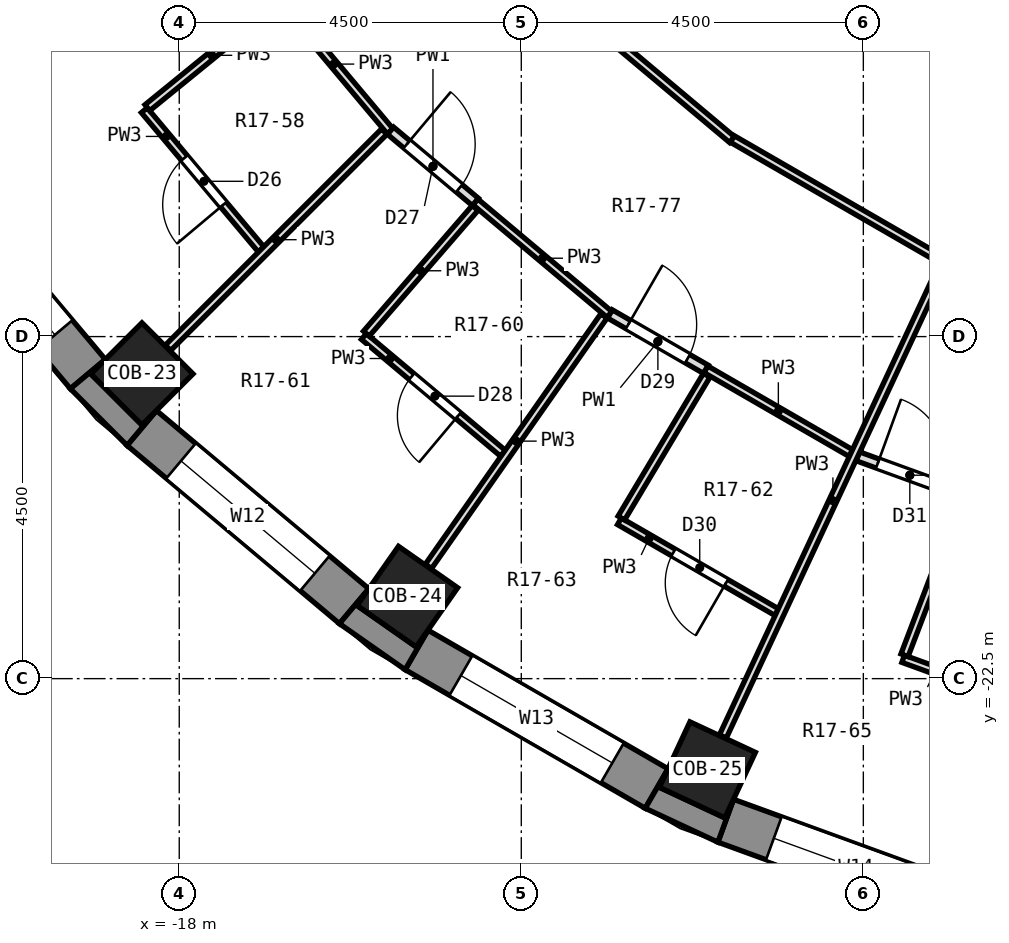
"""IFC4 building model, lengths in metres.
Left out: names, types, materials, properties, quantities, classifications, styles, units other than length and angle.
Written with IfcOpenShell. Run it as: python <this file> out.ifc"""

import sys

from ifc_helpers import new_model, si_unit, direction, frame, frame_2d, origin, origin_2d, place, context, subcontext, project, spatial, polyline, rectangle, outline, extrude, element, fill, save


model = new_model("IFC4")
c1 = context("Model", 3, precision=1e-05, world=origin(), true_north=direction((0.0, 1.0)))
c2 = subcontext(c1, "Body", "Model", "MODEL_VIEW")
j1 = project(units=[si_unit("LENGTHUNIT", "METRE"), si_unit("PLANEANGLEUNIT", "RADIAN")], contexts=[c1])
p1 = place(None, origin())
s1 = spatial("IfcSite", under=j1, at=p1, CompositionType="ELEMENT")
p2 = place(p1, origin())
s2 = spatial("IfcBuilding", under=s1, at=p2, CompositionType="ELEMENT")
p3 = place(p2, frame((0.0, 0.0, 91.9)))
s3 = spatial("IfcBuildingStorey", under=s2, at=p3, CompositionType="ELEMENT", Elevation=91.9)
for number, where, z_axis, x_axis in (
    (1, (-18.491, -18.491, 0.0), (0.0, 0.0, 1.0), (-0.707, -0.707, 0.0)),
    (2, (-14.999, -21.421, 0.0), (0.0, 0.0, 1.0), (-0.574, -0.819, 0.0)),
    (3, (-11.052, -23.7, 0.0), (0.0, 0.0, 1.0), (-0.423, -0.906, 0.0)),
):
    element("IfcColumn", number, at=place(p3, frame(where, z_axis=z_axis, x_axis=x_axis)), inside=s3, PredefinedType="COLUMN", context=c2, shape_type="SweptSolid", body=[
        extrude(rectangle(XDim=0.95, YDim=0.95, at=origin_2d()), origin(), (0.0, 0.0, 1.0), 3.3),
    ])
p4 = place(p3, frame((-21.547, -15.699, 0.0), z_axis=(0.0, 0.0, 1.0), x_axis=(0.642774476932, -0.766055462616, 0.0)))
e4 = element("IfcWall", 4, at=p4, inside=s3, PredefinedType="SOLIDWALL", context=c2, shape_type="SweptSolid", body=[
    extrude(rectangle(XDim=3.648, YDim=0.6, at=frame_2d((1.824, 0.0))), origin(), (0.0, 0.0, 1.0), 2.8),
])
p5 = place(p4, frame((0.674, 0.0, 0.9)))
e5 = element("IfcOpeningElement", 5, at=p5, cuts=e4, PredefinedType="OPENING", context=c2, shape_type="SweptSolid", body=[
    extrude(rectangle(XDim=2.3, YDim=1.8, at=frame_2d((1.15, 0.9))), frame((0.0, 0.312, 0.0), z_axis=(0.0, -1.0, 0.0), x_axis=(1.0, 0.0, 0.0)), (0.0, 0.0, 1.0), 0.624),
])
p6 = place(p3, frame((-18.494, -19.202, 0.0), z_axis=(0.0, 0.0, 1.0), x_axis=(0.766055462616, -0.642774476932, 0.0)))
e6 = element("IfcWall", 6, at=p6, inside=s3, PredefinedType="SOLIDWALL", context=c2, shape_type="SweptSolid", body=[
    extrude(rectangle(XDim=3.648, YDim=0.6, at=frame_2d((1.824, 0.0))), origin(), (0.0, 0.0, 1.0), 2.8),
])
p7 = place(p6, frame((0.674, 0.0, 0.9)))
e7 = element("IfcOpeningElement", 7, at=p7, cuts=e6, PredefinedType="OPENING", context=c2, shape_type="SweptSolid", body=[
    extrude(rectangle(XDim=2.3, YDim=1.8, at=frame_2d((1.15, 0.9))), frame((0.0, 0.312, 0.0), z_axis=(0.0, -1.0, 0.0), x_axis=(1.0, 0.0, 0.0)), (0.0, 0.0, 1.0), 0.624),
])
p8 = place(p3, frame((-14.878, -22.122, 0.0), z_axis=(0.0, 0.0, 1.0), x_axis=(0.866051847062, -0.499954196102, 0.0)))
e8 = element("IfcWall", 8, at=p8, inside=s3, PredefinedType="SOLIDWALL", context=c2, shape_type="SweptSolid", body=[
    extrude(rectangle(XDim=3.648, YDim=0.6, at=frame_2d((1.824, 0.0))), origin(), (0.0, 0.0, 1.0), 2.8),
])
p9 = place(p8, frame((0.674, 0.0, 0.9)))
e9 = element("IfcOpeningElement", 9, at=p9, cuts=e8, PredefinedType="OPENING", context=c2, shape_type="SweptSolid", body=[
    extrude(rectangle(XDim=2.3, YDim=1.8, at=frame_2d((1.15, 0.9))), frame((0.0, 0.312, 0.0), z_axis=(0.0, -1.0, 0.0), x_axis=(1.0, 0.0, 0.0)), (0.0, 0.0, 1.0), 0.624),
])
p10 = place(p3, frame((-10.811, -24.369, 0.0), z_axis=(0.0, 0.0, 1.0), x_axis=(0.939703505393, -0.341990236633, 0.0)))
e10 = element("IfcWall", 10, at=p10, inside=s3, PredefinedType="SOLIDWALL", context=c2, shape_type="SweptSolid", body=[
    extrude(rectangle(XDim=3.648, YDim=0.6, at=frame_2d((1.824, 0.0))), origin(), (0.0, 0.0, 1.0), 2.8),
])
p11 = place(p10, frame((0.674, 0.0, 0.9)))
e11 = element("IfcOpeningElement", 11, at=p11, cuts=e10, PredefinedType="OPENING", context=c2, shape_type="SweptSolid", body=[
    extrude(rectangle(XDim=2.3, YDim=1.8, at=frame_2d((1.15, 0.9))), frame((0.0, 0.312, 0.0), z_axis=(0.0, -1.0, 0.0), x_axis=(1.0, 0.0, 0.0)), (0.0, 0.0, 1.0), 0.624),
])
p12 = place(p3, origin())
e12 = element("IfcWall", 12, at=p12, inside=s3, PredefinedType="SOLIDWALL", context=c2, shape_type="SweptSolid", body=[
    extrude(outline(polyline([(-19.432, -18.686), (-18.686, -19.432), (-18.301, -18.972), (-18.491, -19.163), (-19.163, -18.491), (-18.972, -18.301), (-19.432, -18.686)])), origin(), (0.0, 0.0, 1.0), 2.8),
])
p13 = place(p3, origin())
e13 = element("IfcWall", 13, at=p13, inside=s3, PredefinedType="SOLIDWALL", context=c2, shape_type="SweptSolid", body=[
    extrude(outline(polyline([(-15.028, -22.382), (-14.728, -21.862), (-14.882, -22.083), (-15.661, -21.538), (-15.506, -21.317), (-15.892, -21.777), (-15.028, -22.382)])), origin(), (0.0, 0.0, 1.0), 2.8),
])
p14 = place(p3, origin())
e14 = element("IfcWall", 14, at=p14, inside=s3, PredefinedType="SOLIDWALL", context=c2, shape_type="SweptSolid", body=[
    extrude(outline(polyline([(-10.913, -24.651), (-10.708, -24.087), (-10.822, -24.331), (-11.683, -23.93), (-11.569, -23.686), (-11.869, -24.206), (-10.913, -24.651)])), origin(), (0.0, 0.0, 1.0), 2.8),
])
p15 = place(p3, frame((-18.46, -15.022, 0.0), z_axis=(0.0, 0.0, 1.0), x_axis=(0.642942941421, -0.765914077477, 0.0)))
e15 = element("IfcWall", 15, at=p15, inside=s3, PredefinedType="PARTITIONING", context=c2, shape_type="SweptSolid", body=[
    extrude(rectangle(XDim=2.39, YDim=0.1, at=frame_2d((1.195, 0.0))), origin(), (0.0, 0.0, 1.0), 2.8),
])
p16 = place(p15, frame((0.821, 0.0, 0.0)))
e16 = element("IfcOpeningElement", 16, at=p16, cuts=e15, PredefinedType="OPENING", context=c2, shape_type="SweptSolid", body=[
    extrude(rectangle(XDim=0.8, YDim=2.1, at=frame_2d((0.4, 1.05))), frame((0.0, 0.062, 0.0), z_axis=(0.0, -1.0, 0.0), x_axis=(1.0, 0.0, 0.0)), (0.0, 0.0, 1.0), 0.124),
])
p17 = place(p3, frame((-16.708, -13.532, 0.0), z_axis=(0.0, 0.0, 1.0), x_axis=(0.642762571273, -0.766065452145, 0.0)))
e17 = element("IfcWall", 17, at=p17, inside=s3, PredefinedType="PARTITIONING", context=c2, shape_type="SweptSolid", body=[
    extrude(rectangle(XDim=2.307, YDim=0.1, at=frame_2d((1.153, 0.0))), origin(), (0.0, 0.0, 1.0), 2.8),
])
p18 = place(p3, frame((-15.571, -17.999, 0.0), z_axis=(0.0, 0.0, 1.0), x_axis=(0.765914077477, -0.642942941421, 0.0)))
e18 = element("IfcWall", 18, at=p18, inside=s3, PredefinedType="PARTITIONING", context=c2, shape_type="SweptSolid", body=[
    extrude(rectangle(XDim=2.39, YDim=0.1, at=frame_2d((1.195, 0.0))), origin(), (0.0, 0.0, 1.0), 2.8),
])
p19 = place(p18, frame((0.82, 0.0, 0.0)))
e19 = element("IfcOpeningElement", 19, at=p19, cuts=e18, PredefinedType="OPENING", context=c2, shape_type="SweptSolid", body=[
    extrude(rectangle(XDim=0.8, YDim=2.1, at=frame_2d((0.4, 1.05))), frame((0.0, 0.062, 0.0), z_axis=(0.0, -1.0, 0.0), x_axis=(1.0, 0.0, 0.0)), (0.0, 0.0, 1.0), 0.124),
])
p20 = place(p3, frame((-14.104, -16.228, 0.0), z_axis=(0.0, 0.0, 1.0), x_axis=(0.76604687987, -0.642784705669, 0.0)))
e20 = element("IfcWall", 20, at=p20, inside=s3, PredefinedType="PARTITIONING", context=c2, shape_type="SweptSolid", body=[
    extrude(rectangle(XDim=2.305, YDim=0.1, at=frame_2d((1.153, 0.0))), origin(), (0.0, 0.0, 1.0), 2.8),
])
p21 = place(p3, frame((-15.22, -15.292, 0.0), z_axis=(0.0, 0.0, 1.0), x_axis=(0.766114305984, -0.642704341177, 0.0)))
e21 = element("IfcWall", 21, at=p21, inside=s3, PredefinedType="PARTITIONING", context=c2, shape_type="SweptSolid", body=[
    extrude(rectangle(XDim=1.456, YDim=0.125, at=frame_2d((0.728, 0.0))), origin(), (0.0, 0.0, 1.0), 2.8),
])
p22 = place(p21, frame((0.278, 0.0, 0.0)))
e22 = element("IfcOpeningElement", 22, at=p22, cuts=e21, PredefinedType="OPENING", context=c2, shape_type="SweptSolid", body=[
    extrude(rectangle(XDim=0.9, YDim=2.1, at=frame_2d((0.45, 1.05))), frame((0.0, 0.074, 0.0), z_axis=(0.0, -1.0, 0.0), x_axis=(1.0, 0.0, 0.0)), (0.0, 0.0, 1.0), 0.149),
])
p23 = place(p3, frame((-13.235, -13.305, 0.0), z_axis=(0.0, 0.0, 1.0), x_axis=(0.766132303871, -0.642682886784, 0.0)))
e23 = element("IfcWall", 23, at=p23, inside=s3, PredefinedType="PARTITIONING", context=c2, shape_type="SweptSolid", body=[
    extrude(rectangle(XDim=3.273, YDim=0.1, at=frame_2d((1.636, 0.0))), origin(), (0.0, 0.0, 1.0), 2.8),
])
p24 = place(p3, frame((-12.209, -20.43, 0.0), z_axis=(0.0, 0.0, 1.0), x_axis=(0.865989934965, -0.500061428766, 0.0)))
e24 = element("IfcWall", 24, at=p24, inside=s3, PredefinedType="PARTITIONING", context=c2, shape_type="SweptSolid", body=[
    extrude(rectangle(XDim=2.39, YDim=0.1, at=frame_2d((1.195, 0.0))), origin(), (0.0, 0.0, 1.0), 2.8),
])
p25 = place(p24, frame((0.82, 0.0, 0.0)))
e25 = element("IfcOpeningElement", 25, at=p25, cuts=e24, PredefinedType="OPENING", context=c2, shape_type="SweptSolid", body=[
    extrude(rectangle(XDim=0.8, YDim=2.1, at=frame_2d((0.4, 1.05))), frame((0.0, 0.062, 0.0), z_axis=(0.0, -1.0, 0.0), x_axis=(1.0, 0.0, 0.0)), (0.0, 0.0, 1.0), 0.124),
])
p26 = place(p3, frame((-11.072, -18.43, 0.0), z_axis=(0.0, 0.0, 1.0), x_axis=(0.865848017448, -0.500307116361, 0.0)))
e26 = element("IfcWall", 26, at=p26, inside=s3, PredefinedType="PARTITIONING", context=c2, shape_type="SweptSolid", body=[
    extrude(rectangle(XDim=2.205, YDim=0.1, at=frame_2d((1.102, 0.0))), origin(), (0.0, 0.0, 1.0), 2.8),
])
p27 = place(p3, frame((-12.334, -17.702, 0.0), z_axis=(0.0, 0.0, 1.0), x_axis=(0.866110229381, -0.499853048967, 0.0)))
e27 = element("IfcWall", 27, at=p27, inside=s3, PredefinedType="PARTITIONING", context=c2, shape_type="SweptSolid", body=[
    extrude(rectangle(XDim=1.457, YDim=0.125, at=frame_2d((0.728, 0.0))), origin(), (0.0, 0.0, 1.0), 2.8),
])
p28 = place(p27, frame((0.278, 0.0, 0.0)))
e28 = element("IfcOpeningElement", 28, at=p28, cuts=e27, PredefinedType="OPENING", context=c2, shape_type="SweptSolid", body=[
    extrude(rectangle(XDim=0.9, YDim=2.1, at=frame_2d((0.45, 1.05))), frame((0.0, 0.074, 0.0), z_axis=(0.0, -1.0, 0.0), x_axis=(1.0, 0.0, 0.0)), (0.0, 0.0, 1.0), 0.149),
])
p29 = place(p3, frame((-10.723, -15.401, 0.0), z_axis=(0.0, 0.0, 1.0), x_axis=(0.866002935623, -0.500038913978, 0.0)))
e29 = element("IfcWall", 29, at=p29, inside=s3, PredefinedType="PARTITIONING", context=c2, shape_type="SweptSolid", body=[
    extrude(rectangle(XDim=3.272, YDim=0.1, at=frame_2d((1.636, 0.0))), origin(), (0.0, 0.0, 1.0), 2.8),
])
p30 = place(p3, frame((-8.476, -22.239, 0.0), z_axis=(0.0, 0.0, 1.0), x_axis=(0.939644231496, -0.342153062556, 0.0)))
e30 = element("IfcWall", 30, at=p30, inside=s3, PredefinedType="PARTITIONING", context=c2, shape_type="SweptSolid", body=[
    extrude(rectangle(XDim=2.39, YDim=0.1, at=frame_2d((1.195, 0.0))), origin(), (0.0, 0.0, 1.0), 2.8),
])
p31 = place(p30, frame((0.82, 0.0, 0.0)))
e31 = element("IfcOpeningElement", 31, at=p31, cuts=e30, PredefinedType="OPENING", context=c2, shape_type="SweptSolid", body=[
    extrude(rectangle(XDim=0.8, YDim=2.1, at=frame_2d((0.4, 1.05))), frame((0.0, 0.062, 0.0), z_axis=(0.0, -1.0, 0.0), x_axis=(1.0, 0.0, 0.0)), (0.0, 0.0, 1.0), 0.124),
])
p32 = place(p3, frame((-9.073, -19.575, 0.0), z_axis=(0.0, 0.0, 1.0), x_axis=(0.939788529673, -0.341756520778, 0.0)))
e32 = element("IfcWall", 32, at=p32, inside=s3, PredefinedType="PARTITIONING", context=c2, shape_type="SweptSolid", body=[
    extrude(rectangle(XDim=1.457, YDim=0.125, at=frame_2d((0.728, 0.0))), origin(), (0.0, 0.0, 1.0), 2.8),
])
p33 = place(p32, frame((0.278, 0.0, 0.0)))
e33 = element("IfcOpeningElement", 33, at=p33, cuts=e32, PredefinedType="OPENING", context=c2, shape_type="SweptSolid", body=[
    extrude(rectangle(XDim=0.9, YDim=2.1, at=frame_2d((0.45, 1.05))), frame((0.0, 0.074, 0.0), z_axis=(0.0, -1.0, 0.0), x_axis=(1.0, 0.0, 0.0)), (0.0, 0.0, 1.0), 0.149),
])
p34 = place(p3, frame((-18.419, -14.989, 0.0), z_axis=(0.0, 0.0, 1.0), x_axis=(0.775583643893, 0.63124481093, 0.0)))
e34 = element("IfcWall", 34, at=p34, inside=s3, PredefinedType="PARTITIONING", context=c2, shape_type="SweptSolid", body=[
    extrude(rectangle(XDim=2.184, YDim=0.1, at=frame_2d((1.092, 0.0))), origin(), (0.0, 0.0, 1.0), 2.8),
])
p35 = place(p3, frame((-18.148, -18.148, 0.0), z_axis=(0.0, 0.0, 1.0), x_axis=(0.707106781187, 0.707106781187, 0.0)))
e35 = element("IfcWall", 35, at=p35, inside=s3, PredefinedType="PARTITIONING", context=c2, shape_type="SweptSolid", body=[
    extrude(rectangle(XDim=4.023, YDim=0.1, at=frame_2d((2.011, 0.0))), origin(), (0.0, 0.0, 1.0), 2.8),
])
p36 = place(p3, frame((-15.538, -17.961, 0.0), z_axis=(0.0, 0.0, 1.0), x_axis=(0.654433202149, 0.756119821143, 0.0)))
e36 = element("IfcWall", 36, at=p36, inside=s3, PredefinedType="PARTITIONING", context=c2, shape_type="SweptSolid", body=[
    extrude(rectangle(XDim=2.187, YDim=0.1, at=frame_2d((1.094, 0.0))), origin(), (0.0, 0.0, 1.0), 2.8),
])
p37 = place(p3, frame((-14.721, -21.023, 0.0), z_axis=(0.0, 0.0, 1.0), x_axis=(0.573849206175, 0.818960981105, 0.0)))
e37 = element("IfcWall", 37, at=p37, inside=s3, PredefinedType="PARTITIONING", context=c2, shape_type="SweptSolid", body=[
    extrude(rectangle(XDim=4.023, YDim=0.1, at=frame_2d((2.011, 0.0))), origin(), (0.0, 0.0, 1.0), 2.8),
])
p38 = place(p3, frame((-12.183, -20.387, 0.0), z_axis=(0.0, 0.0, 1.0), x_axis=(0.512903306279, 0.85844638645, 0.0)))
e38 = element("IfcWall", 38, at=p38, inside=s3, PredefinedType="PARTITIONING", context=c2, shape_type="SweptSolid", body=[
    extrude(rectangle(XDim=2.188, YDim=0.1, at=frame_2d((1.094, 0.0))), origin(), (0.0, 0.0, 1.0), 2.8),
])
p39 = place(p3, frame((-10.848, -23.26, 0.0), z_axis=(0.0, 0.0, 1.0), x_axis=(0.422908898334, 0.906172204225, 0.0)))
e39 = element("IfcWall", 39, at=p39, inside=s3, PredefinedType="PARTITIONING", context=c2, shape_type="SweptSolid", body=[
    extrude(rectangle(XDim=6.844, YDim=0.1, at=frame_2d((3.422, 0.0))), origin(), (0.0, 0.0, 1.0), 2.8),
])
p40 = place(p3, frame((-8.458, -22.192, 0.0), z_axis=(0.0, 0.0, 1.0), x_axis=(0.356134598474, 0.93443466747, 0.0)))
e40 = element("IfcWall", 40, at=p40, inside=s3, PredefinedType="PARTITIONING", context=c2, shape_type="SweptSolid", body=[
    extrude(rectangle(XDim=2.187, YDim=0.1, at=frame_2d((1.093, 0.0))), origin(), (0.0, 0.0, 1.0), 2.8),
])
p41 = place(p5, origin())
e41 = element("IfcWindow", 41, at=p41, inside=s3, PartitioningType="SINGLE_PANEL", PredefinedType="WINDOW", context=c2, shape_type="SweptSolid", body=[
    extrude(rectangle(XDim=2.3, YDim=1.8, at=frame_2d((1.15, 0.9))), frame((0.0, 0.18, 0.0), z_axis=(0.0, -1.0, 0.0), x_axis=(1.0, 0.0, 0.0)), (0.0, 0.0, 1.0), 0.06),
])
fill(e5, e41)
p42 = place(p7, origin())
e42 = element("IfcWindow", 42, at=p42, inside=s3, PartitioningType="SINGLE_PANEL", PredefinedType="WINDOW", context=c2, shape_type="SweptSolid", body=[
    extrude(rectangle(XDim=2.3, YDim=1.8, at=frame_2d((1.15, 0.9))), frame((0.0, 0.18, 0.0), z_axis=(0.0, -1.0, 0.0), x_axis=(1.0, 0.0, 0.0)), (0.0, 0.0, 1.0), 0.06),
])
fill(e7, e42)
p43 = place(p9, origin())
e43 = element("IfcWindow", 43, at=p43, inside=s3, PartitioningType="SINGLE_PANEL", PredefinedType="WINDOW", context=c2, shape_type="SweptSolid", body=[
    extrude(rectangle(XDim=2.3, YDim=1.8, at=frame_2d((1.15, 0.9))), frame((0.0, 0.18, 0.0), z_axis=(0.0, -1.0, 0.0), x_axis=(1.0, 0.0, 0.0)), (0.0, 0.0, 1.0), 0.06),
])
fill(e9, e43)
p44 = place(p11, origin())
e44 = element("IfcWindow", 44, at=p44, inside=s3, PartitioningType="SINGLE_PANEL", PredefinedType="WINDOW", context=c2, shape_type="SweptSolid", body=[
    extrude(rectangle(XDim=2.3, YDim=1.8, at=frame_2d((1.15, 0.9))), frame((0.0, 0.18, 0.0), z_axis=(0.0, -1.0, 0.0), x_axis=(1.0, 0.0, 0.0)), (0.0, 0.0, 1.0), 0.06),
])
fill(e11, e44)
p45 = place(p16, frame((0.8, 0.0, 0.0), z_axis=(0.0, 0.0, 1.0), x_axis=(-1.0, 0.0, 0.0)))
e45 = element("IfcDoor", 45, at=p45, inside=s3, OperationType="SINGLE_SWING_LEFT", PredefinedType="DOOR", context=c2, shape_type="SweptSolid", body=[
    extrude(rectangle(XDim=0.8, YDim=2.1, at=frame_2d((0.4, 1.05))), frame((0.0, 0.025, 0.0), z_axis=(0.0, -1.0, 0.0), x_axis=(1.0, 0.0, 0.0)), (0.0, 0.0, 1.0), 0.05),
])
fill(e16, e45)
p46 = place(p22, origin())
e46 = element("IfcDoor", 46, at=p46, inside=s3, OperationType="SINGLE_SWING_LEFT", PredefinedType="DOOR", context=c2, shape_type="SweptSolid", body=[
    extrude(rectangle(XDim=0.9, YDim=2.1, at=frame_2d((0.45, 1.05))), frame((0.0, 0.025, 0.0), z_axis=(0.0, -1.0, 0.0), x_axis=(1.0, 0.0, 0.0)), (0.0, 0.0, 1.0), 0.05),
])
fill(e22, e46)
p47 = place(p19, frame((0.8, 0.0, 0.0), z_axis=(0.0, 0.0, 1.0), x_axis=(-1.0, 0.0, 0.0)))
e47 = element("IfcDoor", 47, at=p47, inside=s3, OperationType="SINGLE_SWING_LEFT", PredefinedType="DOOR", context=c2, shape_type="SweptSolid", body=[
    extrude(rectangle(XDim=0.8, YDim=2.1, at=frame_2d((0.4, 1.05))), frame((0.0, 0.025, 0.0), z_axis=(0.0, -1.0, 0.0), x_axis=(1.0, 0.0, 0.0)), (0.0, 0.0, 1.0), 0.05),
])
fill(e19, e47)
p48 = place(p28, origin())
e48 = element("IfcDoor", 48, at=p48, inside=s3, OperationType="SINGLE_SWING_LEFT", PredefinedType="DOOR", context=c2, shape_type="SweptSolid", body=[
    extrude(rectangle(XDim=0.9, YDim=2.1, at=frame_2d((0.45, 1.05))), frame((0.0, 0.025, 0.0), z_axis=(0.0, -1.0, 0.0), x_axis=(1.0, 0.0, 0.0)), (0.0, 0.0, 1.0), 0.05),
])
fill(e28, e48)
p49 = place(p25, frame((0.8, 0.0, 0.0), z_axis=(0.0, 0.0, 1.0), x_axis=(-1.0, 0.0, 0.0)))
e49 = element("IfcDoor", 49, at=p49, inside=s3, OperationType="SINGLE_SWING_LEFT", PredefinedType="DOOR", context=c2, shape_type="SweptSolid", body=[
    extrude(rectangle(XDim=0.8, YDim=2.1, at=frame_2d((0.4, 1.05))), frame((0.0, 0.025, 0.0), z_axis=(0.0, -1.0, 0.0), x_axis=(1.0, 0.0, 0.0)), (0.0, 0.0, 1.0), 0.05),
])
fill(e25, e49)
p50 = place(p33, origin())
e50 = element("IfcDoor", 50, at=p50, inside=s3, OperationType="SINGLE_SWING_LEFT", PredefinedType="DOOR", context=c2, shape_type="SweptSolid", body=[
    extrude(rectangle(XDim=0.9, YDim=2.1, at=frame_2d((0.45, 1.05))), frame((0.0, 0.025, 0.0), z_axis=(0.0, -1.0, 0.0), x_axis=(1.0, 0.0, 0.0)), (0.0, 0.0, 1.0), 0.05),
])
fill(e33, e50)
save(model, sys.argv[1])
